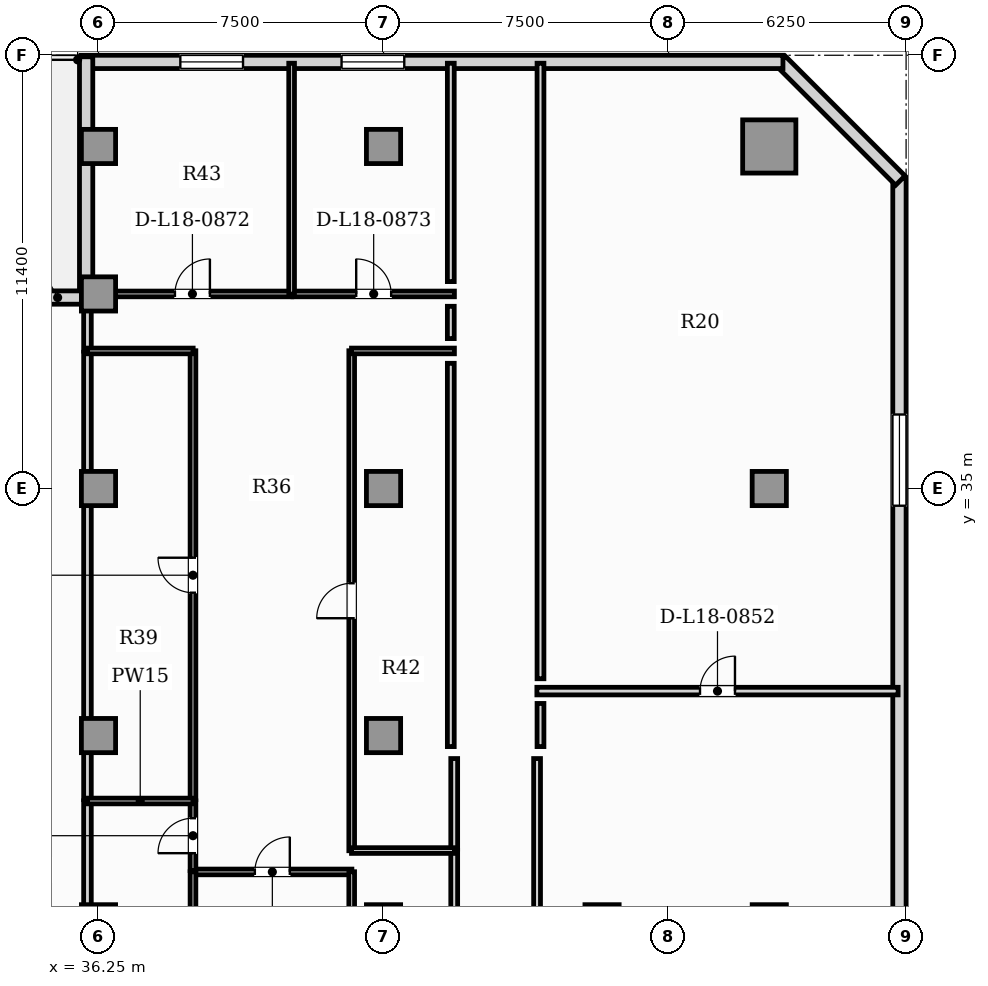
"""IFC4 building model, lengths in metres.
Left out: names, types, materials, properties, quantities, classifications, styles, units other than length and angle.
Written with IfcOpenShell. Run it as: python <this file> out.ifc"""

import sys

from ifc_helpers import new_model, si_unit, direction, frame, frame_2d, origin, origin_2d, place, context, subcontext, project, spatial, rectangle, hollow_rectangle, extrude, element, fill, save


model = new_model("IFC4")
c1 = context("Model", 3, precision=1e-05, world=origin(), true_north=direction((0.0, 1.0)))
c2 = subcontext(c1, "Body", "Model", "MODEL_VIEW")
j1 = project(units=[si_unit("LENGTHUNIT", "METRE"), si_unit("PLANEANGLEUNIT", "RADIAN")], contexts=[c1])
p1 = place(None, origin())
s1 = spatial("IfcSite", under=j1, at=p1, CompositionType="ELEMENT")
p2 = place(p1, origin())
s2 = spatial("IfcBuilding", under=s1, at=p2, CompositionType="ELEMENT")
p3 = place(p2, frame((0.0, 0.0, 76.0)))
s3 = spatial("IfcBuildingStorey", under=s2, at=p3, CompositionType="ELEMENT", Elevation=76.0)
p4 = place(p3, frame((53.9, 44.0, 0.0), z_axis=(0.0, 0.0, 1.0), x_axis=(1.0, 0.0, 0.0)))
e1 = element("IfcColumn", 1, at=p4, inside=s3, PredefinedType="USERDEFINED", context=c2, shape_type="SweptSolid", body=[
    extrude(hollow_rectangle(XDim=1.4, YDim=1.4, WallThickness=0.08, at=origin_2d()), origin(), (0.0, 0.0, 1.0), 5.05),
])
for number, where, z_axis, x_axis in (
    (2, (36.25, 23.6, 0.0), (0.0, 0.0, 1.0), (1.0, 0.0, 0.0)),
    (3, (43.75, 23.6, 0.0), (0.0, 0.0, 1.0), (1.0, 0.0, 0.0)),
    (4, (49.5, 23.6, 0.0), (0.0, 0.0, 1.0), (1.0, 0.0, 0.0)),
    (5, (53.9, 23.6, 0.0), (0.0, 0.0, 1.0), (1.0, 0.0, 0.0)),
    (6, (36.25, 28.5, 0.0), (0.0, 0.0, 1.0), (1.0, 0.0, 0.0)),
    (7, (43.75, 28.5, 0.0), (0.0, 0.0, 1.0), (1.0, 0.0, 0.0)),
    (8, (53.9, 35.0, 0.0), (0.0, 0.0, 1.0), (1.0, 0.0, 0.0)),
    (9, (36.25, 44.0, 0.0), (0.0, 0.0, 1.0), (1.0, 0.0, 0.0)),
    (10, (43.75, 44.0, 0.0), (0.0, 0.0, 1.0), (1.0, 0.0, 0.0)),
    (11, (36.25, 40.12, 0.0), (0.0, 0.0, 1.0), (1.0, 0.0, 0.0)),
    (12, (36.25, 35.0, 0.0), (0.0, 0.0, 1.0), (1.0, 0.0, 0.0)),
    (13, (43.75, 35.0, 0.0), (0.0, 0.0, 1.0), (1.0, 0.0, 0.0)),
):
    element("IfcColumn", number, at=place(p3, frame(where, z_axis=z_axis, x_axis=x_axis)), inside=s3, PredefinedType="COLUMN", context=c2, shape_type="SweptSolid", body=[
        extrude(rectangle(XDim=0.9, YDim=0.9, at=origin_2d()), origin(), (0.0, 0.0, 1.0), 5.05),
    ])
p5 = place(p3, frame((57.325, 3.24, 0.0), z_axis=(0.0, 0.0, 1.0), x_axis=(0.0, 1.0, 0.0)))
e14 = element("IfcWall", 14, at=p5, inside=s3, PredefinedType="SOLIDWALL", context=c2, shape_type="SweptSolid", body=[
    extrude(rectangle(XDim=39.92, YDim=0.35, at=frame_2d((19.96, 0.0))), origin(), (0.0, 0.0, 1.0), 4.8),
])
p6 = place(p5, frame((17.28, 0.0, 0.85)))
e15 = element("IfcOpeningElement", 15, at=p6, cuts=e14, PredefinedType="OPENING", context=c2, shape_type="SweptSolid", body=[
    extrude(rectangle(XDim=2.4, YDim=2.0, at=frame_2d((1.2, 1.0))), frame((0.0, 0.185, 0.0), z_axis=(0.0, -1.0, 0.0), x_axis=(1.0, 0.0, 0.0)), (0.0, 0.0, 1.0), 0.37),
])
p7 = place(p5, frame((31.308, 0.0, 0.85)))
e16 = element("IfcOpeningElement", 16, at=p7, cuts=e14, PredefinedType="OPENING", context=c2, shape_type="SweptSolid", body=[
    extrude(rectangle(XDim=2.4, YDim=2.0, at=frame_2d((1.2, 1.0))), frame((0.0, 0.185, 0.0), z_axis=(0.0, -1.0, 0.0), x_axis=(1.0, 0.0, 0.0)), (0.0, 0.0, 1.0), 0.37),
])
p8 = place(p3, frame((57.348, 43.104, 0.0), z_axis=(0.0, 0.0, 1.0), x_axis=(-0.707079321262, 0.707134240044, 0.0)))
e17 = element("IfcWall", 17, at=p8, inside=s3, PredefinedType="SOLIDWALL", context=c2, shape_type="SweptSolid", body=[
    extrude(rectangle(XDim=4.446, YDim=0.35, at=frame_2d((2.223, 0.0))), origin(), (0.0, 0.0, 1.0), 4.8),
])
p9 = place(p3, frame((54.26, 46.225, 0.0), z_axis=(0.0, 0.0, 1.0), x_axis=(-1.0, 0.0, 0.0)))
e18 = element("IfcWall", 18, at=p9, inside=s3, PredefinedType="SOLIDWALL", context=c2, shape_type="SweptSolid", body=[
    extrude(rectangle(XDim=18.47, YDim=0.35, at=frame_2d((9.235, 0.0))), origin(), (0.0, 0.0, 1.0), 4.8),
])
p10 = place(p9, frame((14.207, 0.0, 0.88)))
e19 = element("IfcOpeningElement", 19, at=p10, cuts=e18, PredefinedType="OPENING", context=c2, shape_type="SweptSolid", body=[
    extrude(rectangle(XDim=1.65, YDim=2.0, at=frame_2d((0.825, 1.0))), frame((0.0, 0.185, 0.0), z_axis=(0.0, -1.0, 0.0), x_axis=(1.0, 0.0, 0.0)), (0.0, 0.0, 1.0), 0.37),
])
p11 = place(p9, frame((9.964, 0.0, 0.88)))
e20 = element("IfcOpeningElement", 20, at=p11, cuts=e18, PredefinedType="OPENING", context=c2, shape_type="SweptSolid", body=[
    extrude(rectangle(XDim=1.65, YDim=2.0, at=frame_2d((0.825, 1.0))), frame((0.0, 0.185, 0.0), z_axis=(0.0, -1.0, 0.0), x_axis=(1.0, 0.0, 0.0)), (0.0, 0.0, 1.0), 0.37),
])
p12 = place(p3, frame((35.925, 46.36, 0.0), z_axis=(0.0, 0.0, 1.0), x_axis=(0.0, -1.0, 0.0)))
e21 = element("IfcWall", 21, at=p12, inside=s3, PredefinedType="SOLIDWALL", context=c2, shape_type="SweptSolid", body=[
    extrude(rectangle(XDim=6.16, YDim=0.35, at=frame_2d((3.08, 0.0))), origin(), (0.0, 0.0, 1.0), 4.8),
])
p13 = place(p3, frame((34.25, 40.025, 0.0), z_axis=(0.0, 0.0, 1.0), x_axis=(1.0, 0.0, 0.0)))
e22 = element("IfcWall", 22, at=p13, inside=s3, PredefinedType="SOLIDWALL", context=c2, shape_type="SweptSolid", body=[
    extrude(rectangle(XDim=1.85, YDim=0.35, at=frame_2d((0.925, 0.0))), origin(), (0.0, 0.0, 1.0), 4.8),
])
p14 = place(p3, frame((47.79, 13.765, 0.0), z_axis=(0.0, 0.0, 1.0), x_axis=(0.0, 1.0, 0.0)))
e23 = element("IfcWall", 23, at=p14, inside=s3, PredefinedType="PARTITIONING", context=c2, shape_type="SweptSolid", body=[
    extrude(rectangle(XDim=14.13, YDim=0.18, at=frame_2d((7.065, 0.0))), origin(), (0.0, 0.0, 1.0), 4.8),
])
p15 = place(p14, frame((6.565, 0.0, 0.0)))
e24 = element("IfcOpeningElement", 24, at=p15, cuts=e23, PredefinedType="OPENING", context=c2, shape_type="SweptSolid", body=[
    extrude(rectangle(XDim=1.0, YDim=2.15, at=frame_2d((0.5, 1.075))), frame((0.0, 0.1, 0.0), z_axis=(0.0, -1.0, 0.0), x_axis=(1.0, 0.0, 0.0)), (0.0, 0.0, 1.0), 0.2),
])
p16 = place(p3, frame((45.61, 17.798, 0.0), z_axis=(0.0, 0.0, 1.0), x_axis=(0.0, 1.0, 0.0)))
e25 = element("IfcWall", 25, at=p16, inside=s3, PredefinedType="PARTITIONING", context=c2, shape_type="SweptSolid", body=[
    extrude(rectangle(XDim=7.681, YDim=0.18, at=frame_2d((3.841, 0.0))), origin(), (0.0, 0.0, 1.0), 4.8),
])
p17 = place(p3, frame((45.61, 25.51, 0.0), z_axis=(0.0, 0.0, 1.0), x_axis=(0.0, 1.0, 0.0)))
e26 = element("IfcWall", 26, at=p17, inside=s3, PredefinedType="PARTITIONING", context=c2, shape_type="SweptSolid", body=[
    extrude(rectangle(XDim=2.385, YDim=0.18, at=frame_2d((1.193, 0.0))), origin(), (0.0, 0.0, 1.0), 4.8),
])
p18 = place(p3, frame((47.785, 29.67, 0.0), z_axis=(0.0, 0.0, 1.0), x_axis=(1.0, 0.0, 0.0)))
e27 = element("IfcWall", 27, at=p18, inside=s3, PredefinedType="PARTITIONING", context=c2, shape_type="SweptSolid", body=[
    extrude(rectangle(XDim=9.505, YDim=0.2, at=frame_2d((4.752, 0.0))), origin(), (0.0, 0.0, 1.0), 4.8),
])
p19 = place(p18, frame((4.292, 0.0, 0.0)))
e28 = element("IfcOpeningElement", 28, at=p19, cuts=e27, PredefinedType="OPENING", context=c2, shape_type="SweptSolid", body=[
    extrude(rectangle(XDim=0.92, YDim=2.1, at=frame_2d((0.46, 1.05))), frame((0.0, 0.11, 0.0), z_axis=(0.0, -1.0, 0.0), x_axis=(1.0, 0.0, 0.0)), (0.0, 0.0, 1.0), 0.22),
])
p20 = place(p3, frame((35.96, 38.615, 0.0), z_axis=(0.0, 0.0, 1.0), x_axis=(0.0, 1.0, 0.0)))
e29 = element("IfcWall", 29, at=p20, inside=s3, PredefinedType="PARTITIONING", context=c2, shape_type="SweptSolid", body=[
    extrude(rectangle(XDim=1.375, YDim=0.2, at=frame_2d((0.688, 0.0))), origin(), (0.0, 0.0, 1.0), 4.8),
])
p21 = place(p3, frame((35.96, 17.585, 0.0), z_axis=(0.0, 0.0, 1.0), x_axis=(0.0, 1.0, 0.0)))
e30 = element("IfcWall", 30, at=p21, inside=s3, PredefinedType="PARTITIONING", context=c2, shape_type="SweptSolid", body=[
    extrude(rectangle(XDim=9.198, YDim=0.2, at=frame_2d((4.599, 0.0))), origin(), (0.0, 0.0, 1.0), 4.8),
])
p22 = place(p3, frame((35.96, 26.813, 0.0), z_axis=(0.0, 0.0, 1.0), x_axis=(0.0, 1.0, 0.0)))
e31 = element("IfcWall", 31, at=p22, inside=s3, PredefinedType="PARTITIONING", context=c2, shape_type="SweptSolid", body=[
    extrude(rectangle(XDim=11.771, YDim=0.2, at=frame_2d((5.886, 0.0))), origin(), (0.0, 0.0, 1.0), 4.8),
])
p23 = place(p3, frame((38.731, 24.912, 0.0), z_axis=(0.0, 0.0, 1.0), x_axis=(1.0, 0.0, 0.0)))
e32 = element("IfcWall", 32, at=p23, inside=s3, PredefinedType="PARTITIONING", context=c2, shape_type="SweptSolid", body=[
    extrude(rectangle(XDim=4.186, YDim=0.15, at=frame_2d((2.093, 0.0))), origin(), (0.0, 0.0, 1.0), 4.8),
])
p24 = place(p23, frame((1.633, 0.0, 0.0)))
e33 = element("IfcOpeningElement", 33, at=p24, cuts=e32, PredefinedType="OPENING", context=c2, shape_type="SweptSolid", body=[
    extrude(rectangle(XDim=0.92, YDim=2.1, at=frame_2d((0.46, 1.05))), frame((0.0, 0.085, 0.0), z_axis=(0.0, -1.0, 0.0), x_axis=(1.0, 0.0, 0.0)), (0.0, 0.0, 1.0), 0.17),
])
p25 = place(p3, frame((38.736, 16.527, 0.0), z_axis=(0.0, 0.0, 1.0), x_axis=(0.0, 1.0, 0.0)))
e34 = element("IfcWall", 34, at=p25, inside=s3, PredefinedType="PARTITIONING", context=c2, shape_type="SweptSolid", body=[
    extrude(rectangle(XDim=8.39, YDim=0.15, at=frame_2d((4.195, 0.0))), origin(), (0.0, 0.0, 1.0), 4.8),
])
p26 = place(p25, frame((3.735, 0.0, 0.0)))
e35 = element("IfcOpeningElement", 35, at=p26, cuts=e34, PredefinedType="OPENING", context=c2, shape_type="SweptSolid", body=[
    extrude(rectangle(XDim=0.92, YDim=2.1, at=frame_2d((0.46, 1.05))), frame((0.0, 0.085, 0.0), z_axis=(0.0, -1.0, 0.0), x_axis=(1.0, 0.0, 0.0)), (0.0, 0.0, 1.0), 0.17),
])
p27 = place(p3, frame((42.913, 17.798, 0.0), z_axis=(0.0, 0.0, 1.0), x_axis=(0.0, 1.0, 0.0)))
e36 = element("IfcWall", 36, at=p27, inside=s3, PredefinedType="PARTITIONING", context=c2, shape_type="SweptSolid", body=[
    extrude(rectangle(XDim=7.119, YDim=0.15, at=frame_2d((3.559, 0.0))), origin(), (0.0, 0.0, 1.0), 4.8),
])
p28 = place(p27, frame((3.099, 0.0, 0.0)))
e37 = element("IfcOpeningElement", 37, at=p28, cuts=e36, PredefinedType="OPENING", context=c2, shape_type="SweptSolid", body=[
    extrude(rectangle(XDim=0.92, YDim=2.1, at=frame_2d((0.46, 1.05))), frame((0.0, 0.085, 0.0), z_axis=(0.0, -1.0, 0.0), x_axis=(1.0, 0.0, 0.0)), (0.0, 0.0, 1.0), 0.17),
])
p29 = place(p3, frame((38.736, 24.947, 0.0), z_axis=(0.0, 0.0, 1.0), x_axis=(0.0, 1.0, 0.0)))
e38 = element("IfcWall", 38, at=p29, inside=s3, PredefinedType="PARTITIONING", context=c2, shape_type="SweptSolid", body=[
    extrude(rectangle(XDim=1.836, YDim=0.15, at=frame_2d((0.918, 0.0))), origin(), (0.0, 0.0, 1.0), 4.8),
])
p30 = place(p29, frame((0.458, 0.0, 0.0)))
e39 = element("IfcOpeningElement", 39, at=p30, cuts=e38, PredefinedType="OPENING", context=c2, shape_type="SweptSolid", body=[
    extrude(rectangle(XDim=0.92, YDim=2.1, at=frame_2d((0.46, 1.05))), frame((0.0, 0.085, 0.0), z_axis=(0.0, -1.0, 0.0), x_axis=(1.0, 0.0, 0.0)), (0.0, 0.0, 1.0), 0.17),
])
p31 = place(p3, frame((38.736, 26.813, 0.0), z_axis=(0.0, 0.0, 1.0), x_axis=(0.0, 1.0, 0.0)))
e40 = element("IfcWall", 40, at=p31, inside=s3, PredefinedType="PARTITIONING", context=c2, shape_type="SweptSolid", body=[
    extrude(rectangle(XDim=11.812, YDim=0.15, at=frame_2d((5.906, 0.0))), origin(), (0.0, 0.0, 1.0), 4.8),
])
p32 = place(p31, frame((5.446, 0.0, 0.0)))
e41 = element("IfcOpeningElement", 41, at=p32, cuts=e40, PredefinedType="OPENING", context=c2, shape_type="SweptSolid", body=[
    extrude(rectangle(XDim=0.92, YDim=2.1, at=frame_2d((0.46, 1.05))), frame((0.0, 0.085, 0.0), z_axis=(0.0, -1.0, 0.0), x_axis=(1.0, 0.0, 0.0)), (0.0, 0.0, 1.0), 0.17),
])
p33 = place(p3, frame((35.955, 38.62, 0.0), z_axis=(0.0, 0.0, 1.0), x_axis=(1.0, 0.0, 0.0)))
e42 = element("IfcWall", 42, at=p33, inside=s3, PredefinedType="PARTITIONING", context=c2, shape_type="SweptSolid", body=[
    extrude(rectangle(XDim=2.786, YDim=0.15, at=frame_2d((1.393, 0.0))), origin(), (0.0, 0.0, 1.0), 4.8),
])
p34 = place(p3, frame((42.913, 25.469, 0.0), z_axis=(0.0, 0.0, 1.0), x_axis=(0.0, 1.0, 0.0)))
e43 = element("IfcWall", 43, at=p34, inside=s3, PredefinedType="PARTITIONING", context=c2, shape_type="SweptSolid", body=[
    extrude(rectangle(XDim=13.156, YDim=0.15, at=frame_2d((6.578, 0.0))), origin(), (0.0, 0.0, 1.0), 4.8),
])
p35 = place(p34, frame((6.118, 0.0, 0.0)))
e44 = element("IfcOpeningElement", 44, at=p35, cuts=e43, PredefinedType="OPENING", context=c2, shape_type="SweptSolid", body=[
    extrude(rectangle(XDim=0.92, YDim=2.1, at=frame_2d((0.46, 1.05))), frame((0.0, 0.085, 0.0), z_axis=(0.0, -1.0, 0.0), x_axis=(1.0, 0.0, 0.0)), (0.0, 0.0, 1.0), 0.17),
])
p36 = place(p3, frame((42.907, 38.62, 0.0), z_axis=(0.0, 0.0, 1.0), x_axis=(1.0, 0.0, 0.0)))
e45 = element("IfcWall", 45, at=p36, inside=s3, PredefinedType="PARTITIONING", context=c2, shape_type="SweptSolid", body=[
    extrude(rectangle(XDim=2.708, YDim=0.15, at=frame_2d((1.354, 0.0))), origin(), (0.0, 0.0, 1.0), 4.8),
])
p37 = place(p3, frame((36.107, 40.12, 0.0), z_axis=(0.0, 0.0, 1.0), x_axis=(1.0, 0.0, 0.0)))
e46 = element("IfcWall", 46, at=p37, inside=s3, PredefinedType="PARTITIONING", context=c2, shape_type="SweptSolid", body=[
    extrude(rectangle(XDim=5.23, YDim=0.15, at=frame_2d((2.615, 0.0))), origin(), (0.0, 0.0, 1.0), 4.8),
])
p38 = place(p37, frame((2.155, 0.0, 0.0)))
e47 = element("IfcOpeningElement", 47, at=p38, cuts=e46, PredefinedType="OPENING", context=c2, shape_type="SweptSolid", body=[
    extrude(rectangle(XDim=0.92, YDim=2.1, at=frame_2d((0.46, 1.05))), frame((0.0, 0.085, 0.0), z_axis=(0.0, -1.0, 0.0), x_axis=(1.0, 0.0, 0.0)), (0.0, 0.0, 1.0), 0.17),
])
p39 = place(p3, frame((41.366, 40.12, 0.0), z_axis=(0.0, 0.0, 1.0), x_axis=(1.0, 0.0, 0.0)))
e48 = element("IfcWall", 48, at=p39, inside=s3, PredefinedType="PARTITIONING", context=c2, shape_type="SweptSolid", body=[
    extrude(rectangle(XDim=4.249, YDim=0.15, at=frame_2d((2.124, 0.0))), origin(), (0.0, 0.0, 1.0), 4.8),
])
p40 = place(p39, frame((1.664, 0.0, 0.0)))
e49 = element("IfcOpeningElement", 49, at=p40, cuts=e48, PredefinedType="OPENING", context=c2, shape_type="SweptSolid", body=[
    extrude(rectangle(XDim=0.92, YDim=2.1, at=frame_2d((0.46, 1.05))), frame((0.0, 0.085, 0.0), z_axis=(0.0, -1.0, 0.0), x_axis=(1.0, 0.0, 0.0)), (0.0, 0.0, 1.0), 0.17),
])
p41 = place(p3, frame((35.955, 26.778, 0.0), z_axis=(0.0, 0.0, 1.0), x_axis=(1.0, 0.0, 0.0)))
e50 = element("IfcWall", 50, at=p41, inside=s3, PredefinedType="PARTITIONING", context=c2, shape_type="SweptSolid", body=[
    extrude(rectangle(XDim=2.786, YDim=0.15, at=frame_2d((1.393, 0.0))), origin(), (0.0, 0.0, 1.0), 4.8),
])
p42 = place(p3, frame((42.907, 25.475, 0.0), z_axis=(0.0, 0.0, 1.0), x_axis=(1.0, 0.0, 0.0)))
e51 = element("IfcWall", 51, at=p42, inside=s3, PredefinedType="PARTITIONING", context=c2, shape_type="SweptSolid", body=[
    extrude(rectangle(XDim=2.708, YDim=0.15, at=frame_2d((1.354, 0.0))), origin(), (0.0, 0.0, 1.0), 4.8),
])
p43 = place(p3, frame((41.332, 40.115, 0.0), z_axis=(0.0, 0.0, 1.0), x_axis=(0.0, 1.0, 0.0)))
e52 = element("IfcWall", 52, at=p43, inside=s3, PredefinedType="PARTITIONING", context=c2, shape_type="SweptSolid", body=[
    extrude(rectangle(XDim=6.075, YDim=0.15, at=frame_2d((3.038, 0.0))), origin(), (0.0, 0.0, 1.0), 4.8),
])
p44 = place(p3, frame((47.88, 28.21, 0.0), z_axis=(0.0, 0.0, 1.0), x_axis=(0.0, 1.0, 0.0)))
e53 = element("IfcWall", 53, at=p44, inside=s3, PredefinedType="PARTITIONING", context=c2, shape_type="SweptSolid", body=[
    extrude(rectangle(XDim=1.135, YDim=0.18, at=frame_2d((0.567, 0.0))), origin(), (0.0, 0.0, 1.0), 4.8),
])
p45 = place(p3, frame((47.88, 29.995, 0.0), z_axis=(0.0, 0.0, 1.0), x_axis=(0.0, 1.0, 0.0)))
e54 = element("IfcWall", 54, at=p45, inside=s3, PredefinedType="PARTITIONING", context=c2, shape_type="SweptSolid", body=[
    extrude(rectangle(XDim=16.195, YDim=0.18, at=frame_2d((8.097, 0.0))), origin(), (0.0, 0.0, 1.0), 4.8),
])
p46 = place(p3, frame((45.52, 39.795, 0.0), z_axis=(0.0, 0.0, 1.0), x_axis=(0.0, -1.0, 0.0)))
e55 = element("IfcWall", 55, at=p46, inside=s3, PredefinedType="PARTITIONING", context=c2, shape_type="SweptSolid", body=[
    extrude(rectangle(XDim=0.85, YDim=0.18, at=frame_2d((0.425, 0.0))), origin(), (0.0, 0.0, 1.0), 4.8),
])
p47 = place(p3, frame((45.52, 38.295, 0.0), z_axis=(0.0, 0.0, 1.0), x_axis=(0.0, -1.0, 0.0)))
e56 = element("IfcWall", 56, at=p47, inside=s3, PredefinedType="PARTITIONING", context=c2, shape_type="SweptSolid", body=[
    extrude(rectangle(XDim=10.085, YDim=0.18, at=frame_2d((5.042, 0.0))), origin(), (0.0, 0.0, 1.0), 4.8),
])
p48 = place(p3, frame((45.52, 46.19, 0.0), z_axis=(0.0, 0.0, 1.0), x_axis=(0.0, -1.0, 0.0)))
e57 = element("IfcWall", 57, at=p48, inside=s3, PredefinedType="PARTITIONING", context=c2, shape_type="SweptSolid", body=[
    extrude(rectangle(XDim=5.745, YDim=0.18, at=frame_2d((2.873, 0.0))), origin(), (0.0, 0.0, 1.0), 4.8),
])
p49 = place(p7, origin())
e58 = element("IfcWindow", 58, at=p49, inside=s3, PartitioningType="SINGLE_PANEL", PredefinedType="WINDOW", context=c2, shape_type="SweptSolid", body=[
    extrude(rectangle(XDim=2.4, YDim=2.0, at=frame_2d((1.2, 1.0))), frame((0.0, 0.03, 0.0), z_axis=(0.0, -1.0, 0.0), x_axis=(1.0, 0.0, 0.0)), (0.0, 0.0, 1.0), 0.06),
])
fill(e16, e58)
p50 = place(p10, origin())
e59 = element("IfcWindow", 59, at=p50, inside=s3, PartitioningType="SINGLE_PANEL", PredefinedType="WINDOW", context=c2, shape_type="SweptSolid", body=[
    extrude(rectangle(XDim=1.65, YDim=2.0, at=frame_2d((0.825, 1.0))), frame((0.0, 0.03, 0.0), z_axis=(0.0, -1.0, 0.0), x_axis=(1.0, 0.0, 0.0)), (0.0, 0.0, 1.0), 0.06),
])
fill(e19, e59)
p51 = place(p11, origin())
e60 = element("IfcWindow", 60, at=p51, inside=s3, PartitioningType="SINGLE_PANEL", PredefinedType="WINDOW", context=c2, shape_type="SweptSolid", body=[
    extrude(rectangle(XDim=1.65, YDim=2.0, at=frame_2d((0.825, 1.0))), frame((0.0, 0.03, 0.0), z_axis=(0.0, -1.0, 0.0), x_axis=(1.0, 0.0, 0.0)), (0.0, 0.0, 1.0), 0.06),
])
fill(e20, e60)
p52 = place(p19, origin())
e61 = element("IfcDoor", 61, at=p52, inside=s3, OperationType="SINGLE_SWING_RIGHT", PredefinedType="DOOR", context=c2, shape_type="SweptSolid", body=[
    extrude(rectangle(XDim=0.92, YDim=2.1, at=frame_2d((0.46, 1.05))), frame((0.0, 0.025, 0.0), z_axis=(0.0, -1.0, 0.0), x_axis=(1.0, 0.0, 0.0)), (0.0, 0.0, 1.0), 0.05),
])
fill(e28, e61)
p53 = place(p24, origin())
e62 = element("IfcDoor", 62, at=p53, inside=s3, OperationType="SINGLE_SWING_RIGHT", PredefinedType="DOOR", context=c2, shape_type="SweptSolid", body=[
    extrude(rectangle(XDim=0.92, YDim=2.1, at=frame_2d((0.46, 1.05))), frame((0.0, 0.025, 0.0), z_axis=(0.0, -1.0, 0.0), x_axis=(1.0, 0.0, 0.0)), (0.0, 0.0, 1.0), 0.05),
])
fill(e33, e62)
p54 = place(p30, origin())
e63 = element("IfcDoor", 63, at=p54, inside=s3, OperationType="SINGLE_SWING_LEFT", PredefinedType="DOOR", context=c2, shape_type="SweptSolid", body=[
    extrude(rectangle(XDim=0.92, YDim=2.1, at=frame_2d((0.46, 1.05))), frame((0.0, 0.025, 0.0), z_axis=(0.0, -1.0, 0.0), x_axis=(1.0, 0.0, 0.0)), (0.0, 0.0, 1.0), 0.05),
])
fill(e39, e63)
p55 = place(p32, origin())
e64 = element("IfcDoor", 64, at=p55, inside=s3, OperationType="SINGLE_SWING_RIGHT", PredefinedType="DOOR", context=c2, shape_type="SweptSolid", body=[
    extrude(rectangle(XDim=0.92, YDim=2.1, at=frame_2d((0.46, 1.05))), frame((0.0, 0.025, 0.0), z_axis=(0.0, -1.0, 0.0), x_axis=(1.0, 0.0, 0.0)), (0.0, 0.0, 1.0), 0.05),
])
fill(e41, e64)
p56 = place(p35, origin())
e65 = element("IfcDoor", 65, at=p56, inside=s3, OperationType="SINGLE_SWING_LEFT", PredefinedType="DOOR", context=c2, shape_type="SweptSolid", body=[
    extrude(rectangle(XDim=0.92, YDim=2.1, at=frame_2d((0.46, 1.05))), frame((0.0, 0.025, 0.0), z_axis=(0.0, -1.0, 0.0), x_axis=(1.0, 0.0, 0.0)), (0.0, 0.0, 1.0), 0.05),
])
fill(e44, e65)
p57 = place(p38, origin())
e66 = element("IfcDoor", 66, at=p57, inside=s3, OperationType="SINGLE_SWING_RIGHT", PredefinedType="DOOR", context=c2, shape_type="SweptSolid", body=[
    extrude(rectangle(XDim=0.92, YDim=2.1, at=frame_2d((0.46, 1.05))), frame((0.0, 0.025, 0.0), z_axis=(0.0, -1.0, 0.0), x_axis=(1.0, 0.0, 0.0)), (0.0, 0.0, 1.0), 0.05),
])
fill(e47, e66)
p58 = place(p40, origin())
e67 = element("IfcDoor", 67, at=p58, inside=s3, OperationType="SINGLE_SWING_LEFT", PredefinedType="DOOR", context=c2, shape_type="SweptSolid", body=[
    extrude(rectangle(XDim=0.92, YDim=2.1, at=frame_2d((0.46, 1.05))), frame((0.0, 0.025, 0.0), z_axis=(0.0, -1.0, 0.0), x_axis=(1.0, 0.0, 0.0)), (0.0, 0.0, 1.0), 0.05),
])
fill(e49, e67)
save(model, sys.argv[1])
